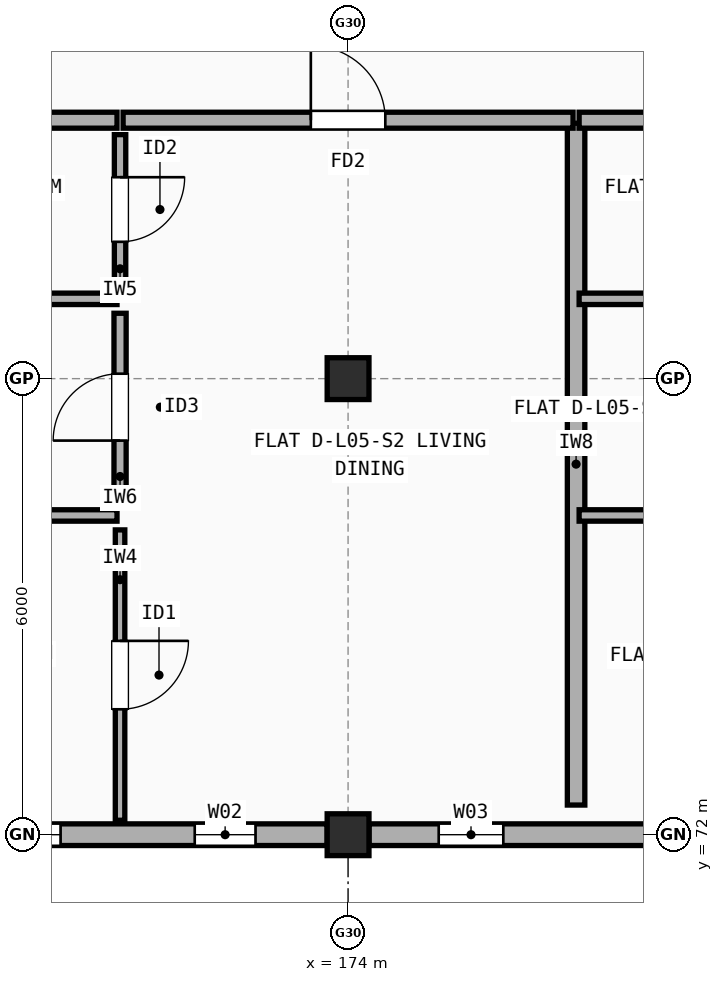
"""IFC4 building model, lengths in metres.
Left out: names, types, materials, properties, quantities, classifications, styles, units other than length and angle.
Written with IfcOpenShell. Run it as: python <this file> out.ifc"""

import sys

from ifc_helpers import new_model, si_unit, direction, frame, frame_2d, origin, origin_2d, place, context, subcontext, project, spatial, rectangle, extrude, element, fill, save


model = new_model("IFC4")
c1 = context("Model", 3, precision=1e-05, world=origin(), true_north=direction((0.0, 1.0)))
c2 = subcontext(c1, "Body", "Model", "MODEL_VIEW")
j1 = project(units=[si_unit("LENGTHUNIT", "METRE"), si_unit("PLANEANGLEUNIT", "RADIAN")], contexts=[c1])
p1 = place(None, origin())
s1 = spatial("IfcSite", under=j1, at=p1, CompositionType="ELEMENT")
p2 = place(p1, origin())
s2 = spatial("IfcBuilding", under=s1, at=p2, CompositionType="ELEMENT")
p3 = place(p2, frame((0.0, 0.0, 17.3)))
s3 = spatial("IfcBuildingStorey", under=s2, at=p3, CompositionType="ELEMENT", Elevation=17.3)
for number, where, z_axis, x_axis in (
    (1, (174.0, 72.0, 0.0), (0.0, 0.0, 1.0), (1.0, 0.0, 0.0)),
    (2, (174.0, 78.0, 0.0), (0.0, 0.0, 1.0), (1.0, 0.0, 0.0)),
):
    element("IfcColumn", number, at=place(p3, frame(where, z_axis=z_axis, x_axis=x_axis)), inside=s3, PredefinedType="COLUMN", context=c2, shape_type="SweptSolid", body=[
        extrude(rectangle(XDim=0.55, YDim=0.55, at=origin_2d()), origin(), (0.0, 0.0, 1.0), 2.965),
    ])
p4 = place(p3, frame((168.275, 72.0, 0.0), z_axis=(0.0, 0.0, 1.0), x_axis=(1.0, 0.0, 0.0)))
e3 = element("IfcWall", 3, at=p4, inside=s3, PredefinedType="STANDARD", context=c2, shape_type="SweptSolid", body=[
    extrude(rectangle(XDim=5.45, YDim=0.285, at=frame_2d((2.725, 0.0))), origin(), (0.0, 0.0, 1.0), 2.447),
])
p5 = place(p4, frame((0.742, 0.0, 0.9)))
e4 = element("IfcOpeningElement", 4, at=p5, cuts=e3, PredefinedType="OPENING", context=c2, shape_type="SweptSolid", body=[
    extrude(rectangle(XDim=1.2, YDim=1.35, at=frame_2d((0.6, 0.675))), frame((0.0, 0.152, 0.0), z_axis=(0.0, -1.0, 0.0), x_axis=(1.0, 0.0, 0.0)), (0.0, 0.0, 1.0), 0.305),
])
p6 = place(p4, frame((3.708, 0.0, 0.9)))
e5 = element("IfcOpeningElement", 5, at=p6, cuts=e3, PredefinedType="OPENING", context=c2, shape_type="SweptSolid", body=[
    extrude(rectangle(XDim=0.8, YDim=1.2, at=frame_2d((0.4, 0.6))), frame((0.0, 0.152, 0.0), z_axis=(0.0, -1.0, 0.0), x_axis=(1.0, 0.0, 0.0)), (0.0, 0.0, 1.0), 0.305),
])
p7 = place(p3, frame((174.275, 72.0, 0.0), z_axis=(0.0, 0.0, 1.0), x_axis=(1.0, 0.0, 0.0)))
e6 = element("IfcWall", 6, at=p7, inside=s3, PredefinedType="STANDARD", context=c2, shape_type="SweptSolid", body=[
    extrude(rectangle(XDim=5.45, YDim=0.285, at=frame_2d((2.725, 0.0))), origin(), (0.0, 0.0, 1.0), 2.447),
])
p8 = place(p7, frame((0.917, 0.0, 0.9)))
e7 = element("IfcOpeningElement", 7, at=p8, cuts=e6, PredefinedType="OPENING", context=c2, shape_type="SweptSolid", body=[
    extrude(rectangle(XDim=0.85, YDim=1.25, at=frame_2d((0.425, 0.625))), frame((0.0, 0.152, 0.0), z_axis=(0.0, -1.0, 0.0), x_axis=(1.0, 0.0, 0.0)), (0.0, 0.0, 1.0), 0.305),
])
p9 = place(p7, frame((3.657, 0.0, 0.9)))
e8 = element("IfcOpeningElement", 8, at=p9, cuts=e6, PredefinedType="OPENING", context=c2, shape_type="SweptSolid", body=[
    extrude(rectangle(XDim=0.9, YDim=1.3, at=frame_2d((0.45, 0.65))), frame((0.0, 0.152, 0.0), z_axis=(0.0, -1.0, 0.0), x_axis=(1.0, 0.0, 0.0)), (0.0, 0.0, 1.0), 0.305),
])
p10 = place(p3, frame((177.0, 72.39, 0.0), z_axis=(0.0, 0.0, 1.0), x_axis=(0.0, 1.0, 0.0)))
e9 = element("IfcWall", 9, at=p10, inside=s3, PredefinedType="SOLIDWALL", context=c2, shape_type="SweptSolid", body=[
    extrude(rectangle(XDim=8.97, YDim=0.23, at=frame_2d((4.485, 0.0))), origin(), (0.0, 0.0, 1.0), 2.447),
])
p11 = place(p3, frame((166.54, 81.4, 0.0), z_axis=(0.0, 0.0, 1.0), x_axis=(1.0, 0.0, 0.0)))
e10 = element("IfcWall", 10, at=p11, inside=s3, PredefinedType="SOLIDWALL", context=c2, shape_type="SweptSolid", body=[
    extrude(rectangle(XDim=4.42, YDim=0.21, at=frame_2d((2.21, 0.0))), origin(), (0.0, 0.0, 1.0), 2.548),
])
p12 = place(p3, frame((171.04, 81.4, 0.0), z_axis=(0.0, 0.0, 1.0), x_axis=(1.0, 0.0, 0.0)))
e11 = element("IfcWall", 11, at=p12, inside=s3, PredefinedType="SOLIDWALL", context=c2, shape_type="SweptSolid", body=[
    extrude(rectangle(XDim=5.92, YDim=0.21, at=frame_2d((2.96, 0.0))), origin(), (0.0, 0.0, 1.0), 2.508),
])
p13 = place(p12, frame((2.47, 0.0, 0.0)))
e12 = element("IfcOpeningElement", 12, at=p13, cuts=e11, PredefinedType="OPENING", context=c2, shape_type="SweptSolid", body=[
    extrude(rectangle(XDim=0.98, YDim=2.15, at=frame_2d((0.49, 1.075))), frame((0.0, 0.115, 0.0), z_axis=(0.0, -1.0, 0.0), x_axis=(1.0, 0.0, 0.0)), (0.0, 0.0, 1.0), 0.23),
])
p14 = place(p3, frame((171.0, 72.19, 0.0), z_axis=(0.0, 0.0, 1.0), x_axis=(0.0, 1.0, 0.0)))
e13 = element("IfcWall", 13, at=p14, inside=s3, PredefinedType="PARTITIONING", context=c2, shape_type="SweptSolid", body=[
    extrude(rectangle(XDim=3.82, YDim=0.125, at=frame_2d((1.91, 0.0))), origin(), (0.0, 0.0, 1.0), 2.965),
])
p15 = place(p14, frame((1.46, 0.0, 0.0)))
e14 = element("IfcOpeningElement", 14, at=p15, cuts=e13, PredefinedType="OPENING", context=c2, shape_type="SweptSolid", body=[
    extrude(rectangle(XDim=0.9, YDim=2.1, at=frame_2d((0.45, 1.05))), frame((0.0, 0.073, 0.0), z_axis=(0.0, -1.0, 0.0), x_axis=(1.0, 0.0, 0.0)), (0.0, 0.0, 1.0), 0.145),
])
p16 = place(p3, frame((171.0, 76.39, 0.0), z_axis=(0.0, 0.0, 1.0), x_axis=(0.0, 1.0, 0.0)))
e15 = element("IfcWall", 15, at=p16, inside=s3, PredefinedType="PLUMBINGWALL", context=c2, shape_type="SweptSolid", body=[
    extrude(rectangle(XDim=2.47, YDim=0.16, at=frame_2d((1.235, 0.0))), origin(), (0.0, 0.0, 1.0), 2.447),
])
p17 = place(p16, frame((0.795, 0.0, 0.0)))
e16 = element("IfcOpeningElement", 16, at=p17, cuts=e15, PredefinedType="OPENING", context=c2, shape_type="SweptSolid", body=[
    extrude(rectangle(XDim=0.88, YDim=2.1, at=frame_2d((0.44, 1.05))), frame((0.0, 0.09, 0.0), z_axis=(0.0, -1.0, 0.0), x_axis=(1.0, 0.0, 0.0)), (0.0, 0.0, 1.0), 0.18),
])
p18 = place(p3, frame((171.0, 79.24, 0.0), z_axis=(0.0, 0.0, 1.0), x_axis=(0.0, 1.0, 0.0)))
e17 = element("IfcWall", 17, at=p18, inside=s3, PredefinedType="PARTITIONING", context=c2, shape_type="SweptSolid", body=[
    extrude(rectangle(XDim=1.97, YDim=0.15, at=frame_2d((0.985, 0.0))), origin(), (0.0, 0.0, 1.0), 2.965),
])
p19 = place(p18, frame((0.56, 0.0, 0.0)))
e18 = element("IfcOpeningElement", 18, at=p19, cuts=e17, PredefinedType="OPENING", context=c2, shape_type="SweptSolid", body=[
    extrude(rectangle(XDim=0.85, YDim=2.1, at=frame_2d((0.425, 1.05))), frame((0.0, 0.085, 0.0), z_axis=(0.0, -1.0, 0.0), x_axis=(1.0, 0.0, 0.0)), (0.0, 0.0, 1.0), 0.17),
])
p20 = place(p3, frame((166.54, 76.2, 0.0), z_axis=(0.0, 0.0, 1.0), x_axis=(1.0, 0.0, 0.0)))
e19 = element("IfcWall", 19, at=p20, inside=s3, PredefinedType="PARTITIONING", context=c2, shape_type="SweptSolid", body=[
    extrude(rectangle(XDim=4.42, YDim=0.15, at=frame_2d((2.21, 0.0))), origin(), (0.0, 0.0, 1.0), 2.458),
])
p21 = place(p3, frame((166.54, 79.05, 0.0), z_axis=(0.0, 0.0, 1.0), x_axis=(1.0, 0.0, 0.0)))
e20 = element("IfcWall", 20, at=p21, inside=s3, PredefinedType="PARTITIONING", context=c2, shape_type="SweptSolid", body=[
    extrude(rectangle(XDim=4.42, YDim=0.15, at=frame_2d((2.21, 0.0))), origin(), (0.0, 0.0, 1.0), 2.548),
])
p22 = place(p3, frame((177.04, 81.4, 0.0), z_axis=(0.0, 0.0, 1.0), x_axis=(1.0, 0.0, 0.0)))
e21 = element("IfcWall", 21, at=p22, inside=s3, PredefinedType="SOLIDWALL", context=c2, shape_type="SweptSolid", body=[
    extrude(rectangle(XDim=4.42, YDim=0.21, at=frame_2d((2.21, 0.0))), origin(), (0.0, 0.0, 1.0), 2.508),
])
p23 = place(p3, frame((177.04, 76.2, 0.0), z_axis=(0.0, 0.0, 1.0), x_axis=(1.0, 0.0, 0.0)))
e22 = element("IfcWall", 22, at=p23, inside=s3, PredefinedType="PARTITIONING", context=c2, shape_type="SweptSolid", body=[
    extrude(rectangle(XDim=4.42, YDim=0.15, at=frame_2d((2.21, 0.0))), origin(), (0.0, 0.0, 1.0), 2.548),
])
p24 = place(p3, frame((177.04, 79.05, 0.0), z_axis=(0.0, 0.0, 1.0), x_axis=(1.0, 0.0, 0.0)))
e23 = element("IfcWall", 23, at=p24, inside=s3, PredefinedType="PARTITIONING", context=c2, shape_type="SweptSolid", body=[
    extrude(rectangle(XDim=4.42, YDim=0.15, at=frame_2d((2.21, 0.0))), origin(), (0.0, 0.0, 1.0), 2.508),
])
p25 = place(p5, origin())
e24 = element("IfcWindow", 24, at=p25, inside=s3, PartitioningType="SINGLE_PANEL", PredefinedType="WINDOW", context=c2, shape_type="SweptSolid", body=[
    extrude(rectangle(XDim=1.2, YDim=1.35, at=frame_2d((0.6, 0.675))), frame((0.0, 0.03, 0.0), z_axis=(0.0, -1.0, 0.0), x_axis=(1.0, 0.0, 0.0)), (0.0, 0.0, 1.0), 0.06),
])
fill(e4, e24)
p26 = place(p6, origin())
e25 = element("IfcWindow", 25, at=p26, inside=s3, PartitioningType="SINGLE_PANEL", PredefinedType="WINDOW", context=c2, shape_type="SweptSolid", body=[
    extrude(rectangle(XDim=0.8, YDim=1.2, at=frame_2d((0.4, 0.6))), frame((0.0, 0.03, 0.0), z_axis=(0.0, -1.0, 0.0), x_axis=(1.0, 0.0, 0.0)), (0.0, 0.0, 1.0), 0.06),
])
fill(e5, e25)
p27 = place(p8, origin())
e26 = element("IfcWindow", 26, at=p27, inside=s3, PartitioningType="SINGLE_PANEL", PredefinedType="WINDOW", context=c2, shape_type="SweptSolid", body=[
    extrude(rectangle(XDim=0.85, YDim=1.25, at=frame_2d((0.425, 0.625))), frame((0.0, 0.03, 0.0), z_axis=(0.0, -1.0, 0.0), x_axis=(1.0, 0.0, 0.0)), (0.0, 0.0, 1.0), 0.06),
])
fill(e7, e26)
p28 = place(p13, origin())
e27 = element("IfcDoor", 27, at=p28, inside=s3, OperationType="SINGLE_SWING_LEFT", PredefinedType="DOOR", context=c2, shape_type="SweptSolid", body=[
    extrude(rectangle(XDim=0.98, YDim=2.15, at=frame_2d((0.49, 1.075))), frame((0.0, 0.025, 0.0), z_axis=(0.0, -1.0, 0.0), x_axis=(1.0, 0.0, 0.0)), (0.0, 0.0, 1.0), 0.05),
])
fill(e12, e27)
p29 = place(p15, origin())
e28 = element("IfcDoor", 28, at=p29, inside=s3, OperationType="SINGLE_SWING_RIGHT", PredefinedType="DOOR", context=c2, shape_type="SweptSolid", body=[
    extrude(rectangle(XDim=0.9, YDim=2.1, at=frame_2d((0.45, 1.05))), frame((0.0, 0.025, 0.0), z_axis=(0.0, -1.0, 0.0), x_axis=(1.0, 0.0, 0.0)), (0.0, 0.0, 1.0), 0.05),
])
fill(e14, e28)
p30 = place(p17, origin())
e29 = element("IfcDoor", 29, at=p30, inside=s3, OperationType="SINGLE_SWING_LEFT", PredefinedType="DOOR", context=c2, shape_type="SweptSolid", body=[
    extrude(rectangle(XDim=0.88, YDim=2.1, at=frame_2d((0.44, 1.05))), frame((0.0, 0.025, 0.0), z_axis=(0.0, -1.0, 0.0), x_axis=(1.0, 0.0, 0.0)), (0.0, 0.0, 1.0), 0.05),
])
fill(e16, e29)
p31 = place(p19, origin())
e30 = element("IfcDoor", 30, at=p31, inside=s3, OperationType="SINGLE_SWING_RIGHT", PredefinedType="DOOR", context=c2, shape_type="SweptSolid", body=[
    extrude(rectangle(XDim=0.85, YDim=2.1, at=frame_2d((0.425, 1.05))), frame((0.0, 0.025, 0.0), z_axis=(0.0, -1.0, 0.0), x_axis=(1.0, 0.0, 0.0)), (0.0, 0.0, 1.0), 0.05),
])
fill(e18, e30)
save(model, sys.argv[1])
